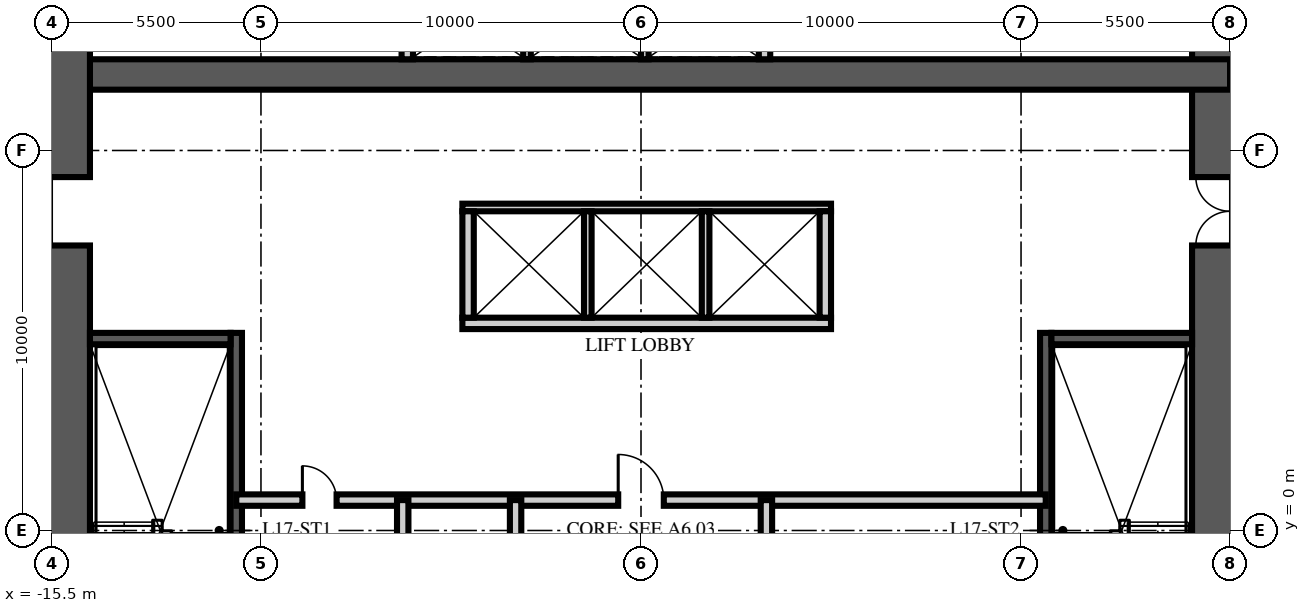
"""IFC4 building model, lengths in metres.
Left out: names, types, materials, properties, quantities, classifications, styles, units other than length and angle.
Written with IfcOpenShell. Run it as: python <this file> out.ifc"""

import sys

from ifc_helpers import new_model, si_unit, direction, frame, frame_2d, origin, place, context, subcontext, project, spatial, rectangle, extrude, element, fill, save


model = new_model("IFC4")
c1 = context("Model", 3, precision=1e-05, world=origin(), true_north=direction((0.0, 1.0)))
c2 = subcontext(c1, "Body", "Model", "MODEL_VIEW")
j1 = project(units=[si_unit("LENGTHUNIT", "METRE"), si_unit("PLANEANGLEUNIT", "RADIAN")], contexts=[c1])
p1 = place(None, origin())
s1 = spatial("IfcSite", under=j1, at=p1, CompositionType="ELEMENT")
p2 = place(p1, origin())
s2 = spatial("IfcBuilding", under=s1, at=p2, CompositionType="ELEMENT")
p3 = place(p2, frame((0.0, 0.0, 69.75)))
s3 = spatial("IfcBuildingStorey", under=s2, at=p3, CompositionType="ELEMENT", Elevation=69.75)
p4 = place(p3, frame((15.5, -15.5, -0.25), z_axis=(0.0, 0.0, 1.0), x_axis=(0.0, 1.0, 0.0)))
e1 = element("IfcWall", 1, at=p4, inside=s3, PredefinedType="SHEAR", context=c2, shape_type="SweptSolid", body=[
    extrude(rectangle(XDim=31.0, YDim=2.0, at=frame_2d((15.5, 0.0))), origin(), (0.0, 0.0, 1.0), 3.75),
])
p5 = place(p4, frame((6.5, 0.0, 0.25)))
e2 = element("IfcOpeningElement", 2, at=p5, cuts=e1, PredefinedType="OPENING", context=c2, shape_type="SweptSolid", body=[
    extrude(rectangle(XDim=1.2, YDim=2.1, at=frame_2d((0.6, 1.05))), frame((0.0, 1.01, 0.0), z_axis=(0.0, -1.0, 0.0), x_axis=(1.0, 0.0, 0.0)), (0.0, 0.0, 1.0), 2.02),
])
p6 = place(p4, frame((23.0, 0.0, 0.25)))
e3 = element("IfcOpeningElement", 3, at=p6, cuts=e1, PredefinedType="OPENING", context=c2, shape_type="SweptSolid", body=[
    extrude(rectangle(XDim=1.8, YDim=2.1, at=frame_2d((0.9, 1.05))), frame((0.0, 1.01, 0.0), z_axis=(0.0, -1.0, 0.0), x_axis=(1.0, 0.0, 0.0)), (0.0, 0.0, 1.0), 2.02),
])
p7 = place(p3, frame((-15.5, 12.0, -0.25), z_axis=(0.0, 0.0, 1.0), x_axis=(1.0, 0.0, 0.0)))
e4 = element("IfcWall", 4, at=p7, inside=s3, PredefinedType="SHEAR", context=c2, shape_type="SweptSolid", body=[
    extrude(rectangle(XDim=31.0, YDim=0.8, at=frame_2d((15.5, 0.0))), origin(), (0.0, 0.0, 1.0), 3.75),
])
p8 = place(p3, frame((-15.5, -15.5, -0.25), z_axis=(0.0, 0.0, 1.0), x_axis=(0.0, 1.0, 0.0)))
e5 = element("IfcWall", 5, at=p8, inside=s3, PredefinedType="SHEAR", context=c2, shape_type="SweptSolid", body=[
    extrude(rectangle(XDim=31.0, YDim=2.0, at=frame_2d((15.5, 0.0))), origin(), (0.0, 0.0, 1.0), 3.75),
])
p9 = place(p8, frame((6.5, 0.0, 0.25)))
e6 = element("IfcOpeningElement", 6, at=p9, cuts=e5, PredefinedType="OPENING", context=c2, shape_type="SweptSolid", body=[
    extrude(rectangle(XDim=1.2, YDim=2.1, at=frame_2d((0.6, 1.05))), frame((0.0, 1.01, 0.0), z_axis=(0.0, -1.0, 0.0), x_axis=(1.0, 0.0, 0.0)), (0.0, 0.0, 1.0), 2.02),
])
p10 = place(p8, frame((23.0, 0.0, 0.25)))
e7 = element("IfcOpeningElement", 7, at=p10, cuts=e5, PredefinedType="OPENING", context=c2, shape_type="SweptSolid", body=[
    extrude(rectangle(XDim=1.8, YDim=2.1, at=frame_2d((0.9, 1.05))), frame((0.0, 1.01, 0.0), z_axis=(0.0, -1.0, 0.0), x_axis=(1.0, 0.0, 0.0)), (0.0, 0.0, 1.0), 2.02),
])
p11 = place(p3, frame((-10.65, -4.9, 0.0), z_axis=(0.0, 0.0, 1.0), x_axis=(0.0, 1.0, 0.0)))
e8 = element("IfcWall", 8, at=p11, inside=s3, PredefinedType="SOLIDWALL", context=c2, shape_type="SweptSolid", body=[
    extrude(rectangle(XDim=10.1, YDim=0.3, at=frame_2d((5.05, 0.0))), origin(), (0.0, 0.0, 1.0), 3.5),
])
p12 = place(p3, frame((-14.5, 5.05, 0.0), z_axis=(0.0, 0.0, 1.0), x_axis=(1.0, 0.0, 0.0)))
e9 = element("IfcWall", 9, at=p12, inside=s3, PredefinedType="SOLIDWALL", context=c2, shape_type="SweptSolid", body=[
    extrude(rectangle(XDim=3.7, YDim=0.3, at=frame_2d((1.85, 0.0))), origin(), (0.0, 0.0, 1.0), 3.5),
])
p13 = place(p3, frame((10.65, -4.9, 0.0), z_axis=(0.0, 0.0, 1.0), x_axis=(0.0, 1.0, 0.0)))
e10 = element("IfcWall", 10, at=p13, inside=s3, PredefinedType="SOLIDWALL", context=c2, shape_type="SweptSolid", body=[
    extrude(rectangle(XDim=10.1, YDim=0.3, at=frame_2d((5.05, 0.0))), origin(), (0.0, 0.0, 1.0), 3.5),
])
p14 = place(p3, frame((14.5, 5.05, 0.0), z_axis=(0.0, 0.0, 1.0), x_axis=(-1.0, 0.0, 0.0)))
e11 = element("IfcWall", 11, at=p14, inside=s3, PredefinedType="SOLIDWALL", context=c2, shape_type="SweptSolid", body=[
    extrude(rectangle(XDim=3.7, YDim=0.3, at=frame_2d((1.85, 0.0))), origin(), (0.0, 0.0, 1.0), 3.5),
])
p15 = place(p3, frame((-4.7, 5.45, 0.0), z_axis=(0.0, 0.0, 1.0), x_axis=(1.0, 0.0, 0.0)))
e12 = element("IfcWall", 12, at=p15, inside=s3, PredefinedType="PARTITIONING", context=c2, shape_type="SweptSolid", body=[
    extrude(rectangle(XDim=9.7, YDim=0.3, at=frame_2d((4.85, 0.0))), origin(), (0.0, 0.0, 1.0), 3.5),
])
p16 = place(p3, frame((-4.7, 8.5, 0.0), z_axis=(0.0, 0.0, 1.0), x_axis=(1.0, 0.0, 0.0)))
e13 = element("IfcWall", 13, at=p16, inside=s3, PredefinedType="PARTITIONING", context=c2, shape_type="SweptSolid", body=[
    extrude(rectangle(XDim=9.7, YDim=0.2, at=frame_2d((4.85, 0.0))), origin(), (0.0, 0.0, 1.0), 3.5),
])
for number, where, z_axis, x_axis in (
    (14, (-4.55, 5.6, 0.0), (0.0, 0.0, 1.0), (0.0, 1.0, 0.0)),
    (15, (4.85, 5.6, 0.0), (0.0, 0.0, 1.0), (0.0, 1.0, 0.0)),
):
    element("IfcWall", number, at=place(p3, frame(where, z_axis=z_axis, x_axis=x_axis)), inside=s3, PredefinedType="PARTITIONING", context=c2, shape_type="SweptSolid", body=[
        extrude(rectangle(XDim=2.8, YDim=0.3, at=frame_2d((1.4, 0.0))), origin(), (0.0, 0.0, 1.0), 3.5),
    ])
for number, where, z_axis, x_axis in (
    (16, (-1.4, 5.6, 0.0), (0.0, 0.0, 1.0), (0.0, 1.0, 0.0)),
    (17, (1.7, 5.6, 0.0), (0.0, 0.0, 1.0), (0.0, 1.0, 0.0)),
):
    element("IfcWall", number, at=place(p3, frame(where, z_axis=z_axis, x_axis=x_axis)), inside=s3, PredefinedType="PARTITIONING", context=c2, shape_type="SweptSolid", body=[
        extrude(rectangle(XDim=2.8, YDim=0.2, at=frame_2d((1.4, 0.0))), origin(), (0.0, 0.0, 1.0), 3.5),
    ])
for number, where, z_axis, x_axis in (
    (18, (-6.15, 12.4, 0.0), (0.0, 0.0, 1.0), (0.0, 1.0, 0.0)),
    (19, (3.25, 12.4, 0.0), (0.0, 0.0, 1.0), (0.0, 1.0, 0.0)),
):
    element("IfcWall", number, at=place(p3, frame(where, z_axis=z_axis, x_axis=x_axis)), inside=s3, PredefinedType="PARTITIONING", context=c2, shape_type="SweptSolid", body=[
        extrude(rectangle(XDim=2.1, YDim=0.3, at=frame_2d((1.05, 0.0))), origin(), (0.0, 0.0, 1.0), 3.5),
    ])
for number, where, z_axis, x_axis in (
    (20, (-3.0, 12.4, 0.0), (0.0, 0.0, 1.0), (0.0, 1.0, 0.0)),
    (21, (0.1, 12.4, 0.0), (0.0, 0.0, 1.0), (0.0, 1.0, 0.0)),
):
    element("IfcWall", number, at=place(p3, frame(where, z_axis=z_axis, x_axis=x_axis)), inside=s3, PredefinedType="PARTITIONING", context=c2, shape_type="SweptSolid", body=[
        extrude(rectangle(XDim=2.1, YDim=0.2, at=frame_2d((1.05, 0.0))), origin(), (0.0, 0.0, 1.0), 3.5),
    ])
p17 = place(p3, frame((-10.65, 0.8, 0.0), z_axis=(0.0, 0.0, 1.0), x_axis=(1.0, 0.0, 0.0)))
e22 = element("IfcWall", 22, at=p17, inside=s3, PredefinedType="PARTITIONING", context=c2, shape_type="SweptSolid", body=[
    extrude(rectangle(XDim=21.3, YDim=0.3, at=frame_2d((10.65, 0.0))), origin(), (0.0, 0.0, 1.0), 3.5),
])
p18 = place(p17, frame((10.05, 0.0, 0.0)))
e23 = element("IfcOpeningElement", 23, at=p18, cuts=e22, PredefinedType="OPENING", context=c2, shape_type="SweptSolid", body=[
    extrude(rectangle(XDim=1.2, YDim=2.1, at=frame_2d((0.6, 1.05))), frame((0.0, 0.16, 0.0), z_axis=(0.0, -1.0, 0.0), x_axis=(1.0, 0.0, 0.0)), (0.0, 0.0, 1.0), 0.32),
])
p19 = place(p17, frame((1.74, 0.0, 0.0)))
e24 = element("IfcOpeningElement", 24, at=p19, cuts=e22, PredefinedType="OPENING", context=c2, shape_type="SweptSolid", body=[
    extrude(rectangle(XDim=0.9, YDim=2.1, at=frame_2d((0.45, 1.05))), frame((0.0, 0.16, 0.0), z_axis=(0.0, -1.0, 0.0), x_axis=(1.0, 0.0, 0.0)), (0.0, 0.0, 1.0), 0.32),
])
p20 = place(p3, frame((-3.3, -6.65, 0.0), z_axis=(0.0, 0.0, 1.0), x_axis=(0.0, 1.0, 0.0)))
e25 = element("IfcWall", 25, at=p20, inside=s3, PredefinedType="PARTITIONING", context=c2, shape_type="SweptSolid", body=[
    extrude(rectangle(XDim=7.45, YDim=0.3, at=frame_2d((3.725, 0.0))), origin(), (0.0, 0.0, 1.0), 3.5),
])
p21 = place(p20, frame((3.275, 0.0, 0.0)))
e26 = element("IfcOpeningElement", 26, at=p21, cuts=e25, PredefinedType="OPENING", context=c2, shape_type="SweptSolid", body=[
    extrude(rectangle(XDim=0.9, YDim=2.1, at=frame_2d((0.45, 1.05))), frame((0.0, 0.16, 0.0), z_axis=(0.0, -1.0, 0.0), x_axis=(1.0, 0.0, 0.0)), (0.0, 0.0, 1.0), 0.32),
])
p22 = place(p3, frame((3.3, -6.65, 0.0), z_axis=(0.0, 0.0, 1.0), x_axis=(0.0, 1.0, 0.0)))
e27 = element("IfcWall", 27, at=p22, inside=s3, PredefinedType="PARTITIONING", context=c2, shape_type="SweptSolid", body=[
    extrude(rectangle(XDim=7.45, YDim=0.3, at=frame_2d((3.725, 0.0))), origin(), (0.0, 0.0, 1.0), 3.5),
])
p23 = place(p22, frame((1.231, 0.0, 0.0)))
e28 = element("IfcOpeningElement", 28, at=p23, cuts=e27, PredefinedType="OPENING", context=c2, shape_type="SweptSolid", body=[
    extrude(rectangle(XDim=0.9, YDim=2.1, at=frame_2d((0.45, 1.05))), frame((0.0, 0.16, 0.0), z_axis=(0.0, -1.0, 0.0), x_axis=(1.0, 0.0, 0.0)), (0.0, 0.0, 1.0), 0.32),
])
p24 = place(p22, frame((4.956, 0.0, 0.0)))
e29 = element("IfcOpeningElement", 29, at=p24, cuts=e27, PredefinedType="OPENING", context=c2, shape_type="SweptSolid", body=[
    extrude(rectangle(XDim=0.9, YDim=2.1, at=frame_2d((0.45, 1.05))), frame((0.0, 0.16, 0.0), z_axis=(0.0, -1.0, 0.0), x_axis=(1.0, 0.0, 0.0)), (0.0, 0.0, 1.0), 0.32),
])
p25 = place(p3, frame((-6.27, -6.65, 0.0), z_axis=(0.0, 0.0, 1.0), x_axis=(0.0, 1.0, 0.0)))
e30 = element("IfcWall", 30, at=p25, inside=s3, PredefinedType="PARTITIONING", context=c2, shape_type="SweptSolid", body=[
    extrude(rectangle(XDim=7.45, YDim=0.3, at=frame_2d((3.725, 0.0))), origin(), (0.0, 0.0, 1.0), 3.5),
])
p26 = place(p10, origin())
e31 = element("IfcDoor", 31, at=p26, inside=s3, OperationType="DOUBLE_DOOR_SINGLE_SWING", PredefinedType="DOOR", context=c2, shape_type="SweptSolid", body=[
    extrude(rectangle(XDim=1.8, YDim=2.1, at=frame_2d((0.9, 1.05))), frame((0.0, 0.025, 0.0), z_axis=(0.0, -1.0, 0.0), x_axis=(1.0, 0.0, 0.0)), (0.0, 0.0, 1.0), 0.05),
])
fill(e7, e31)
p27 = place(p6, origin())
e32 = element("IfcDoor", 32, at=p27, inside=s3, OperationType="DOUBLE_DOOR_SINGLE_SWING", PredefinedType="DOOR", context=c2, shape_type="SweptSolid", body=[
    extrude(rectangle(XDim=1.8, YDim=2.1, at=frame_2d((0.9, 1.05))), frame((0.0, 0.025, 0.0), z_axis=(0.0, -1.0, 0.0), x_axis=(1.0, 0.0, 0.0)), (0.0, 0.0, 1.0), 0.05),
])
fill(e3, e32)
p28 = place(p18, origin())
e33 = element("IfcDoor", 33, at=p28, inside=s3, OperationType="SINGLE_SWING_LEFT", PredefinedType="DOOR", context=c2, shape_type="SweptSolid", body=[
    extrude(rectangle(XDim=1.2, YDim=2.1, at=frame_2d((0.6, 1.05))), frame((0.0, 0.025, 0.0), z_axis=(0.0, -1.0, 0.0), x_axis=(1.0, 0.0, 0.0)), (0.0, 0.0, 1.0), 0.05),
])
fill(e23, e33)
p29 = place(p19, origin())
e34 = element("IfcDoor", 34, at=p29, inside=s3, OperationType="SINGLE_SWING_LEFT", PredefinedType="DOOR", context=c2, shape_type="SweptSolid", body=[
    extrude(rectangle(XDim=0.9, YDim=2.1, at=frame_2d((0.45, 1.05))), frame((0.0, 0.025, 0.0), z_axis=(0.0, -1.0, 0.0), x_axis=(1.0, 0.0, 0.0)), (0.0, 0.0, 1.0), 0.05),
])
fill(e24, e34)
save(model, sys.argv[1])
